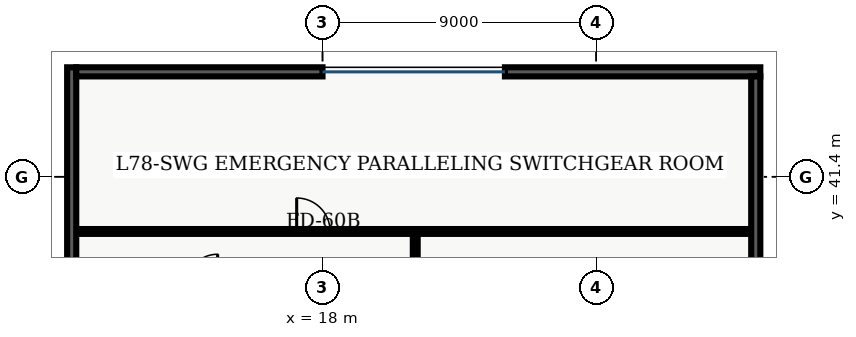
"""IFC4 building model, lengths in metres.
Left out: names, types, materials, properties, quantities, classifications, styles, units other than length and angle.
Written with IfcOpenShell. Run it as: python <this file> out.ifc"""

import sys

from ifc_helpers import new_model, entity, si_unit, converted_unit, direction, frame, origin_with_axes, origin_2d_with_axis, place, context, subcontext, project, spatial, polyline, rectangle, outline, extrude, element, fill, save


model = new_model("IFC4")
c1 = context("Model", 3, precision=1e-05, world=origin_with_axes(), true_north=direction((0.0, 1.0)))
c2 = subcontext(c1, "Body", "Model", "MODEL_VIEW")
j1 = project(units=[si_unit("LENGTHUNIT", "METRE"), converted_unit("PLANEANGLEUNIT", "DEGREE", entity("IfcPlaneAngleMeasure", 0.017), si_unit("PLANEANGLEUNIT", "RADIAN"), dimensions=[0, 0, 0, 0, 0, 0, 0])], contexts=[c1])
p1 = place(None, origin_with_axes())
s1 = spatial("IfcSite", under=j1, at=p1, CompositionType="ELEMENT")
p2 = place(p1, origin_with_axes())
s2 = spatial("IfcBuilding", under=s1, at=p2, CompositionType="ELEMENT")
p3 = place(p2, frame((0.0, 0.0, 316.5), z_axis=(0.0, 0.0, 1.0), x_axis=(1.0, 0.0, 0.0)))
s3 = spatial("IfcBuildingStorey", under=s2, at=p3, CompositionType="ELEMENT", Elevation=316.5)
p4 = place(p3, frame((21.05, 34.4, 0.0), z_axis=(0.0, 0.0, 1.0), x_axis=(0.0, 1.0, 0.0)))
e1 = element("IfcWall", 1, at=p4, inside=s3, PredefinedType="PARTITIONING", context=c2, shape_type="SweptSolid", body=[
    extrude(outline(polyline([(0.0, -0.08), (5.2, -0.08), (5.2, 0.08), (0.0, 0.08), (0.0, -0.08)])), origin_with_axes(), (0.0, 0.0, 1.0), 2.68),
])
p5 = place(p4, frame((1.45, 0.0, 0.0), z_axis=(0.0, 0.0, 1.0), x_axis=(1.0, 0.0, 0.0)))
e2 = element("IfcOpeningElement", 2, at=p5, cuts=e1, PredefinedType="OPENING", context=c2, shape_type="SweptSolid", body=[
    extrude(rectangle(XDim=0.9, YDim=0.18, at=origin_2d_with_axis()), origin_with_axes(), (0.0, 0.0, 1.0), 2.15),
])
p6 = place(p3, frame((9.895, 39.6, 0.0), z_axis=(0.0, 0.0, 1.0), x_axis=(1.0, 0.0, 0.0)))
e3 = element("IfcWall", 3, at=p6, inside=s3, PredefinedType="PARTITIONING", context=c2, shape_type="SweptSolid", body=[
    extrude(outline(polyline([(0.0, -0.08), (22.21, -0.08), (22.21, 0.08), (0.0, 0.08), (0.0, -0.08)])), origin_with_axes(), (0.0, 0.0, 1.0), 2.68),
])
p7 = place(p6, frame((7.805, 0.0, 0.0), z_axis=(0.0, 0.0, 1.0), x_axis=(1.0, 0.0, 0.0)))
e4 = element("IfcOpeningElement", 4, at=p7, cuts=e3, PredefinedType="OPENING", context=c2, shape_type="SweptSolid", body=[
    extrude(rectangle(XDim=1.1, YDim=0.18, at=origin_2d_with_axis()), origin_with_axes(), (0.0, 0.0, 1.0), 2.15),
])
p8 = place(p3, frame((9.75, 3.9, 0.0), z_axis=(0.0, 0.0, 1.0), x_axis=(0.0, 1.0, 0.0)))
e5 = element("IfcWall", 5, at=p8, inside=s3, PredefinedType="SOLIDWALL", context=c2, shape_type="SweptSolid", body=[
    extrude(outline(polyline([(0.0, -0.15), (41.1, -0.15), (41.1, 0.15), (0.0, 0.15), (0.0, -0.15)])), origin_with_axes(), (0.0, 0.0, 1.0), 3.64),
])
p9 = place(p3, frame((9.9, 44.85, 0.0), z_axis=(0.0, 0.0, 1.0), x_axis=(1.0, 0.0, 0.0)))
e6 = element("IfcWall", 6, at=p9, inside=s3, PredefinedType="SOLIDWALL", context=c2, shape_type="SweptSolid", body=[
    extrude(outline(polyline([(0.0, -0.15), (8.1, -0.15), (8.1, 0.15), (0.0, 0.15), (0.0, -0.15)])), origin_with_axes(), (0.0, 0.0, 1.0), 3.64),
])
p10 = place(p3, frame((24.0, 44.85, 0.0), z_axis=(0.0, 0.0, 1.0), x_axis=(1.0, 0.0, 0.0)))
e7 = element("IfcWall", 7, at=p10, inside=s3, PredefinedType="SOLIDWALL", context=c2, shape_type="SweptSolid", body=[
    extrude(outline(polyline([(0.0, -0.15), (8.4, -0.15), (8.4, 0.15), (0.0, 0.15), (0.0, -0.15)])), origin_with_axes(), (0.0, 0.0, 1.0), 3.64),
])
p11 = place(p3, frame((32.25, 44.7, 0.0), z_axis=(0.0, 0.0, 1.0), x_axis=(0.0, -1.0, 0.0)))
e8 = element("IfcWall", 8, at=p11, inside=s3, PredefinedType="SOLIDWALL", context=c2, shape_type="SweptSolid", body=[
    extrude(outline(polyline([(0.0, -0.15), (7.7, -0.15), (7.7, 0.15), (0.0, 0.15), (0.0, -0.15)])), origin_with_axes(), (0.0, 0.0, 1.0), 3.64),
])
p12 = place(p6, frame((7.805, 0.0, 0.0), z_axis=(0.0, 0.0, 1.0), x_axis=(1.0, 0.0, 0.0)))
e9 = element("IfcDoor", 9, at=p12, inside=s3, OperationType="SINGLE_SWING_LEFT", PredefinedType="DOOR", context=c2, shape_type="SweptSolid", body=[
    extrude(rectangle(XDim=1.1, YDim=0.09, at=origin_2d_with_axis()), origin_with_axes(), (0.0, 0.0, 1.0), 2.15),
])
fill(e4, e9)
save(model, sys.argv[1])
